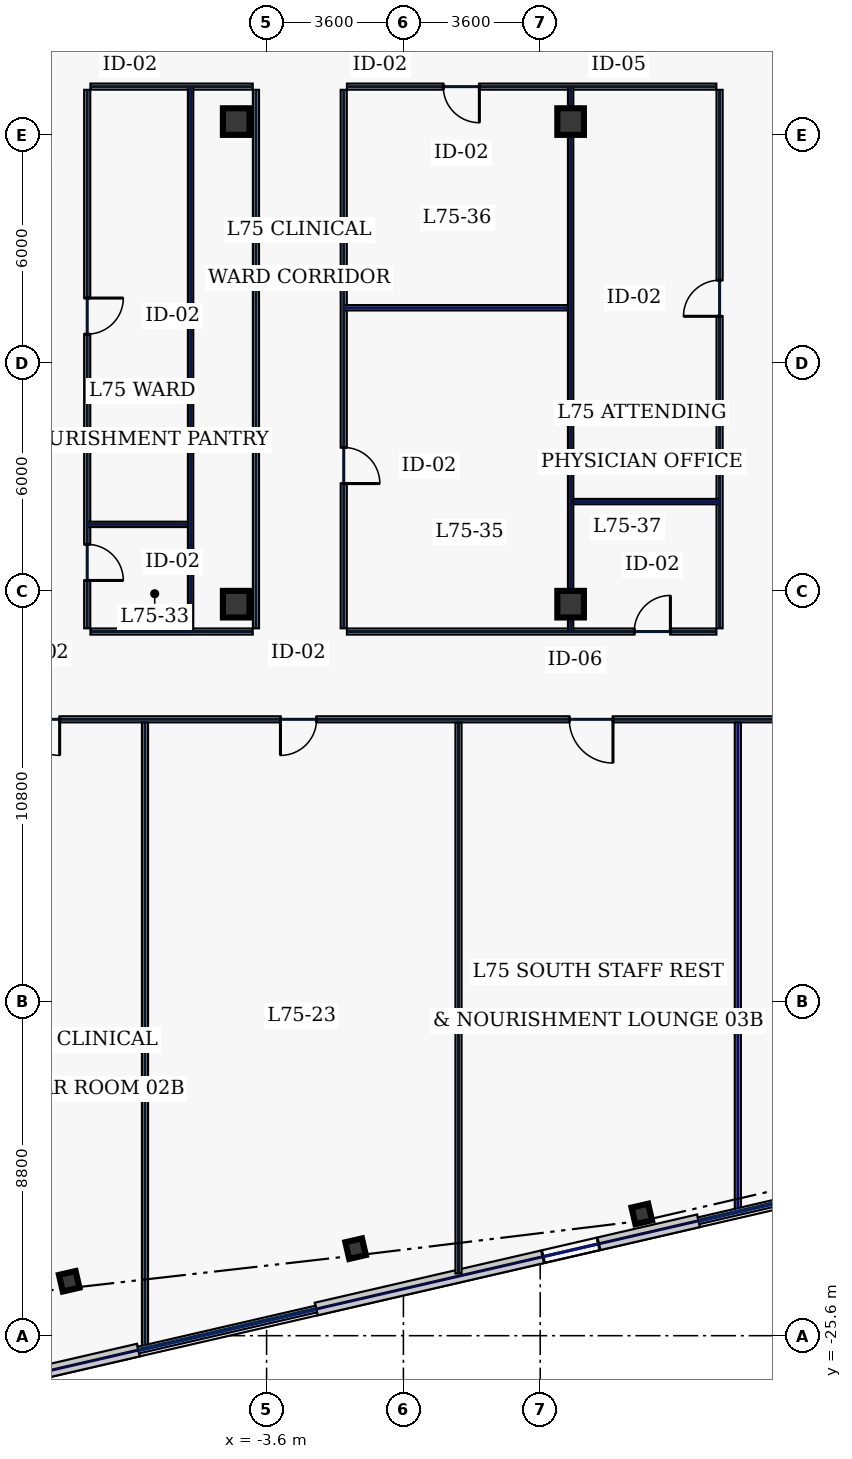
"""IFC4 building model, lengths in metres.
Left out: names, types, materials, properties, quantities, classifications, styles, units other than length and angle.
Written with IfcOpenShell. Run it as: python <this file> out.ifc"""

import sys

from ifc_helpers import new_model, si_unit, direction, frame, frame_2d, origin, origin_2d, place, context, subcontext, project, spatial, rectangle, hollow_rectangle, extrude, element, fill, save


model = new_model("IFC4")
c1 = context("Model", 3, precision=1e-05, world=origin(), true_north=direction((0.0, 1.0)))
c2 = subcontext(c1, "Body", "Model", "MODEL_VIEW")
j1 = project(units=[si_unit("LENGTHUNIT", "METRE"), si_unit("PLANEANGLEUNIT", "RADIAN")], contexts=[c1])
p1 = place(None, origin())
s1 = spatial("IfcSite", under=j1, at=p1, CompositionType="ELEMENT")
p2 = place(p1, origin())
s2 = spatial("IfcBuilding", under=s1, at=p2, CompositionType="ELEMENT")
p3 = place(p2, frame((0.0, 0.0, 321.0)))
s3 = spatial("IfcBuildingStorey", under=s2, at=p3, CompositionType="ELEMENT", Elevation=321.0)
for number, where, z_axis, x_axis in (
    (1, (-4.4, -6.35, 0.0), (0.0, 0.0, 1.0), (1.0, 0.0, 0.0)),
    (2, (4.4, -6.35, 0.0), (0.0, 0.0, 1.0), (1.0, 0.0, 0.0)),
    (3, (-4.4, 6.35, 0.0), (0.0, 0.0, 1.0), (1.0, 0.0, 0.0)),
    (4, (4.4, 6.35, 0.0), (0.0, 0.0, 1.0), (1.0, 0.0, 0.0)),
):
    element("IfcColumn", number, at=place(p3, frame(where, z_axis=z_axis, x_axis=x_axis)), inside=s3, PredefinedType="COLUMN", context=c2, shape_type="SweptSolid", body=[
        extrude(hollow_rectangle(XDim=0.7, YDim=0.7, WallThickness=0.032, at=origin_2d()), origin(), (0.0, 0.0, 1.0), 3.74),
    ])
for number, where, z_axis, x_axis in (
    (5, (-8.794, -24.168, 0.0), (0.0, 0.0, 1.0), (0.974, 0.225, 0.0)),
    (6, (-1.258, -23.31, 0.0), (0.0, 0.0, 1.0), (0.974, 0.225, 0.0)),
    (7, (6.273, -22.397, 0.0), (0.0, 0.0, 1.0), (0.974, 0.225, 0.0)),
):
    element("IfcColumn", number, at=place(p3, frame(where, z_axis=z_axis, x_axis=x_axis)), inside=s3, PredefinedType="COLUMN", context=c2, shape_type="SweptSolid", body=[
        extrude(hollow_rectangle(XDim=0.45, YDim=0.45, WallThickness=0.022, at=origin_2d()), origin(), (0.0, 0.0, 1.0), 3.74),
    ])
p4 = place(p3, frame((-24.03, -29.916, 0.0), z_axis=(0.0, 0.0, 1.0), x_axis=(0.974370978061, 0.224947098473, 0.0)))
e8 = element("IfcWall", 8, at=p4, inside=s3, PredefinedType="STANDARD", context=c2, shape_type="SweptSolid", body=[
    extrude(rectangle(XDim=17.506, YDim=0.34, at=frame_2d((8.753, 0.0))), origin(), (0.0, 0.0, 1.0), 3.74),
])
p5 = place(p4, frame((2.35, 0.0, 0.9)))
e9 = element("IfcOpeningElement", 9, at=p5, cuts=e8, PredefinedType="OPENING", context=c2, shape_type="SweptSolid", body=[
    extrude(rectangle(XDim=1.5, YDim=2.0, at=frame_2d((0.75, 1.0))), frame((0.0, 0.18, 0.0), z_axis=(0.0, -1.0, 0.0), x_axis=(1.0, 0.0, 0.0)), (0.0, 0.0, 1.0), 0.36),
])
p6 = place(p4, frame((5.817, 0.0, 0.9)))
e10 = element("IfcOpeningElement", 10, at=p6, cuts=e8, PredefinedType="OPENING", context=c2, shape_type="SweptSolid", body=[
    extrude(rectangle(XDim=1.5, YDim=2.0, at=frame_2d((0.75, 1.0))), frame((0.0, 0.18, 0.0), z_axis=(0.0, -1.0, 0.0), x_axis=(1.0, 0.0, 0.0)), (0.0, 0.0, 1.0), 0.36),
])
p7 = place(p4, frame((9.886, 0.0, 0.9)))
e11 = element("IfcOpeningElement", 11, at=p7, cuts=e8, PredefinedType="OPENING", context=c2, shape_type="SweptSolid", body=[
    extrude(rectangle(XDim=1.5, YDim=2.0, at=frame_2d((0.75, 1.0))), frame((0.0, 0.18, 0.0), z_axis=(0.0, -1.0, 0.0), x_axis=(1.0, 0.0, 0.0)), (0.0, 0.0, 1.0), 0.36),
])
p8 = place(p4, frame((13.353, 0.0, 0.9)))
e12 = element("IfcOpeningElement", 12, at=p8, cuts=e8, PredefinedType="OPENING", context=c2, shape_type="SweptSolid", body=[
    extrude(rectangle(XDim=1.5, YDim=2.0, at=frame_2d((0.75, 1.0))), frame((0.0, 0.18, 0.0), z_axis=(0.0, -1.0, 0.0), x_axis=(1.0, 0.0, 0.0)), (0.0, 0.0, 1.0), 0.36),
])
p9 = place(p3, frame((-2.295, -24.898, 0.0), z_axis=(0.0, 0.0, 1.0), x_axis=(0.974370872906, 0.224947553958, 0.0)))
e13 = element("IfcWall", 13, at=p9, inside=s3, PredefinedType="STANDARD", context=c2, shape_type="SweptSolid", body=[
    extrude(rectangle(XDim=10.328, YDim=0.34, at=frame_2d((5.164, 0.0))), origin(), (0.0, 0.0, 1.0), 3.74),
])
p10 = place(p9, frame((6.124, 0.0, 0.9)))
e14 = element("IfcOpeningElement", 14, at=p10, cuts=e13, PredefinedType="OPENING", context=c2, shape_type="SweptSolid", body=[
    extrude(rectangle(XDim=1.5, YDim=2.0, at=frame_2d((0.75, 1.0))), frame((0.0, 0.18, 0.0), z_axis=(0.0, -1.0, 0.0), x_axis=(1.0, 0.0, 0.0)), (0.0, 0.0, 1.0), 0.36),
])
p11 = place(p3, frame((24.145, -9.38, 0.0), z_axis=(0.0, 0.0, 1.0), x_axis=(-1.0, 0.0, 0.0)))
e15 = element("IfcWall", 15, at=p11, inside=s3, PredefinedType="PARTITIONING", context=c2, shape_type="SweptSolid", body=[
    extrude(rectangle(XDim=36.68, YDim=0.16, at=frame_2d((18.34, 0.0))), origin(), (0.0, 0.0, 1.0), 3.74),
])
p12 = place(p11, frame((33.19, 0.0, 0.0)))
e16 = element("IfcOpeningElement", 16, at=p12, cuts=e15, PredefinedType="OPENING", context=c2, shape_type="SweptSolid", body=[
    extrude(rectangle(XDim=0.95, YDim=2.2, at=frame_2d((0.475, 1.1))), frame((0.0, 0.09, 0.0), z_axis=(0.0, -1.0, 0.0), x_axis=(1.0, 0.0, 0.0)), (0.0, 0.0, 1.0), 0.18),
])
p13 = place(p11, frame((26.43, 0.0, 0.0)))
e17 = element("IfcOpeningElement", 17, at=p13, cuts=e15, PredefinedType="OPENING", context=c2, shape_type="SweptSolid", body=[
    extrude(rectangle(XDim=0.95, YDim=2.2, at=frame_2d((0.475, 1.1))), frame((0.0, 0.09, 0.0), z_axis=(0.0, -1.0, 0.0), x_axis=(1.0, 0.0, 0.0)), (0.0, 0.0, 1.0), 0.18),
])
p14 = place(p11, frame((18.63, 0.0, 0.0)))
e18 = element("IfcOpeningElement", 18, at=p14, cuts=e15, PredefinedType="OPENING", context=c2, shape_type="SweptSolid", body=[
    extrude(rectangle(XDim=1.15, YDim=2.2, at=frame_2d((0.575, 1.1))), frame((0.0, 0.09, 0.0), z_axis=(0.0, -1.0, 0.0), x_axis=(1.0, 0.0, 0.0)), (0.0, 0.0, 1.0), 0.18),
])
p15 = place(p11, frame((9.565, 0.0, 0.0)))
e19 = element("IfcOpeningElement", 19, at=p15, cuts=e15, PredefinedType="OPENING", context=c2, shape_type="SweptSolid", body=[
    extrude(rectangle(XDim=0.95, YDim=2.2, at=frame_2d((0.475, 1.1))), frame((0.0, 0.09, 0.0), z_axis=(0.0, -1.0, 0.0), x_axis=(1.0, 0.0, 0.0)), (0.0, 0.0, 1.0), 0.18),
])
p16 = place(p11, frame((1.869, 0.0, 0.0)))
e20 = element("IfcOpeningElement", 20, at=p16, cuts=e15, PredefinedType="OPENING", context=c2, shape_type="SweptSolid", body=[
    extrude(rectangle(XDim=1.3, YDim=2.2, at=frame_2d((0.65, 1.1))), frame((0.0, 0.09, 0.0), z_axis=(0.0, -1.0, 0.0), x_axis=(1.0, 0.0, 0.0)), (0.0, 0.0, 1.0), 0.18),
])
p17 = place(p3, frame((8.235, 7.27, 0.0), z_axis=(0.0, 0.0, 1.0), x_axis=(-1.0, 0.0, 0.0)))
e21 = element("IfcWall", 21, at=p17, inside=s3, PredefinedType="PARTITIONING", context=c2, shape_type="SweptSolid", body=[
    extrude(rectangle(XDim=9.72, YDim=0.16, at=frame_2d((4.86, 0.0))), origin(), (0.0, 0.0, 1.0), 3.74),
])
p18 = place(p17, frame((6.236, 0.0, 0.0)))
e22 = element("IfcOpeningElement", 22, at=p18, cuts=e21, PredefinedType="OPENING", context=c2, shape_type="SweptSolid", body=[
    extrude(rectangle(XDim=0.95, YDim=2.2, at=frame_2d((0.475, 1.1))), frame((0.0, 0.09, 0.0), z_axis=(0.0, -1.0, 0.0), x_axis=(1.0, 0.0, 0.0)), (0.0, 0.0, 1.0), 0.18),
])
p19 = place(p3, frame((-1.57, 7.185, 0.0), z_axis=(0.0, 0.0, 1.0), x_axis=(0.0, -1.0, 0.0)))
e23 = element("IfcWall", 23, at=p19, inside=s3, PredefinedType="PARTITIONING", context=c2, shape_type="SweptSolid", body=[
    extrude(rectangle(XDim=14.17, YDim=0.16, at=frame_2d((7.085, 0.0))), origin(), (0.0, 0.0, 1.0), 3.74),
])
p20 = place(p19, frame((9.411, 0.0, 0.0)))
e24 = element("IfcOpeningElement", 24, at=p20, cuts=e23, PredefinedType="OPENING", context=c2, shape_type="SweptSolid", body=[
    extrude(rectangle(XDim=0.95, YDim=2.2, at=frame_2d((0.475, 1.1))), frame((0.0, 0.09, 0.0), z_axis=(0.0, -1.0, 0.0), x_axis=(1.0, 0.0, 0.0)), (0.0, 0.0, 1.0), 0.18),
])
p21 = place(p3, frame((-1.485, -7.07, 0.0), z_axis=(0.0, 0.0, 1.0), x_axis=(1.0, 0.0, 0.0)))
e25 = element("IfcWall", 25, at=p21, inside=s3, PredefinedType="PARTITIONING", context=c2, shape_type="SweptSolid", body=[
    extrude(rectangle(XDim=9.72, YDim=0.16, at=frame_2d((4.86, 0.0))), origin(), (0.0, 0.0, 1.0), 3.74),
])
p22 = place(p21, frame((7.561, 0.0, 0.0)))
e26 = element("IfcOpeningElement", 26, at=p22, cuts=e25, PredefinedType="OPENING", context=c2, shape_type="SweptSolid", body=[
    extrude(rectangle(XDim=0.95, YDim=2.2, at=frame_2d((0.475, 1.1))), frame((0.0, 0.09, 0.0), z_axis=(0.0, -1.0, 0.0), x_axis=(1.0, 0.0, 0.0)), (0.0, 0.0, 1.0), 0.18),
])
p23 = place(p3, frame((8.32, -6.985, 0.0), z_axis=(0.0, 0.0, 1.0), x_axis=(0.0, 1.0, 0.0)))
e27 = element("IfcWall", 27, at=p23, inside=s3, PredefinedType="PARTITIONING", context=c2, shape_type="SweptSolid", body=[
    extrude(rectangle(XDim=14.17, YDim=0.16, at=frame_2d((7.085, 0.0))), origin(), (0.0, 0.0, 1.0), 3.74),
])
p24 = place(p23, frame((8.211, 0.0, 0.0)))
e28 = element("IfcOpeningElement", 28, at=p24, cuts=e27, PredefinedType="OPENING", context=c2, shape_type="SweptSolid", body=[
    extrude(rectangle(XDim=0.95, YDim=2.2, at=frame_2d((0.475, 1.1))), frame((0.0, 0.09, 0.0), z_axis=(0.0, -1.0, 0.0), x_axis=(1.0, 0.0, 0.0)), (0.0, 0.0, 1.0), 0.18),
])
p25 = place(p3, frame((-3.88, -6.985, 0.0), z_axis=(0.0, 0.0, 1.0), x_axis=(0.0, 1.0, 0.0)))
e29 = element("IfcWall", 29, at=p25, inside=s3, PredefinedType="PARTITIONING", context=c2, shape_type="SweptSolid", body=[
    extrude(rectangle(XDim=14.17, YDim=0.16, at=frame_2d((7.085, 0.0))), origin(), (0.0, 0.0, 1.0), 3.74),
])
p26 = place(p3, frame((-3.965, 7.27, 0.0), z_axis=(0.0, 0.0, 1.0), x_axis=(-1.0, 0.0, 0.0)))
e30 = element("IfcWall", 30, at=p26, inside=s3, PredefinedType="PARTITIONING", context=c2, shape_type="SweptSolid", body=[
    extrude(rectangle(XDim=4.27, YDim=0.16, at=frame_2d((2.135, 0.0))), origin(), (0.0, 0.0, 1.0), 3.74),
])
p27 = place(p3, frame((-8.32, 7.185, 0.0), z_axis=(0.0, 0.0, 1.0), x_axis=(0.0, -1.0, 0.0)))
e31 = element("IfcWall", 31, at=p27, inside=s3, PredefinedType="PARTITIONING", context=c2, shape_type="SweptSolid", body=[
    extrude(rectangle(XDim=14.17, YDim=0.16, at=frame_2d((7.085, 0.0))), origin(), (0.0, 0.0, 1.0), 3.74),
])
p28 = place(p27, frame((11.961, 0.0, 0.0)))
e32 = element("IfcOpeningElement", 32, at=p28, cuts=e31, PredefinedType="OPENING", context=c2, shape_type="SweptSolid", body=[
    extrude(rectangle(XDim=0.95, YDim=2.2, at=frame_2d((0.475, 1.1))), frame((0.0, 0.09, 0.0), z_axis=(0.0, -1.0, 0.0), x_axis=(1.0, 0.0, 0.0)), (0.0, 0.0, 1.0), 0.18),
])
p29 = place(p27, frame((5.479, 0.0, 0.0)))
e33 = element("IfcOpeningElement", 33, at=p29, cuts=e31, PredefinedType="OPENING", context=c2, shape_type="SweptSolid", body=[
    extrude(rectangle(XDim=0.95, YDim=2.2, at=frame_2d((0.475, 1.1))), frame((0.0, 0.09, 0.0), z_axis=(0.0, -1.0, 0.0), x_axis=(1.0, 0.0, 0.0)), (0.0, 0.0, 1.0), 0.18),
])
p30 = place(p3, frame((-8.235, -7.07, 0.0), z_axis=(0.0, 0.0, 1.0), x_axis=(1.0, 0.0, 0.0)))
e34 = element("IfcWall", 34, at=p30, inside=s3, PredefinedType="PARTITIONING", context=c2, shape_type="SweptSolid", body=[
    extrude(rectangle(XDim=4.27, YDim=0.16, at=frame_2d((2.135, 0.0))), origin(), (0.0, 0.0, 1.0), 3.74),
])
p31 = place(p3, frame((-6.8, -25.867, 0.0), z_axis=(0.0, 0.0, 1.0), x_axis=(0.0, 1.0, 0.0)))
e35 = element("IfcWall", 35, at=p31, inside=s3, PredefinedType="PARTITIONING", context=c2, shape_type="SweptSolid", body=[
    extrude(rectangle(XDim=16.402, YDim=0.16, at=frame_2d((8.201, 0.0))), origin(), (0.0, 0.0, 1.0), 3.74),
])
p32 = place(p3, frame((8.8, -22.265, 0.0), z_axis=(0.0, 0.0, 1.0), x_axis=(0.0, 1.0, 0.0)))
e36 = element("IfcWall", 36, at=p32, inside=s3, PredefinedType="PARTITIONING", context=c2, shape_type="SweptSolid", body=[
    extrude(rectangle(XDim=12.8, YDim=0.16, at=frame_2d((6.4, 0.0))), origin(), (0.0, 0.0, 1.0), 3.165),
])
p33 = place(p3, frame((1.45, -23.962, 0.0), z_axis=(0.0, 0.0, 1.0), x_axis=(0.0, 1.0, 0.0)))
e37 = element("IfcWall", 37, at=p33, inside=s3, PredefinedType="PARTITIONING", context=c2, shape_type="SweptSolid", body=[
    extrude(rectangle(XDim=14.497, YDim=0.16, at=frame_2d((7.249, 0.0))), origin(), (0.0, 0.0, 1.0), 3.74),
])
p34 = place(p3, frame((-5.6, -7.065, 0.0), z_axis=(0.0, 0.0, 1.0), x_axis=(0.0, 1.0, 0.0)))
e38 = element("IfcWall", 38, at=p34, inside=s3, PredefinedType="PARTITIONING", context=c2, shape_type="SweptSolid", body=[
    extrude(rectangle(XDim=14.33, YDim=0.14, at=frame_2d((7.165, 0.0))), origin(), (0.0, 0.0, 1.0), 3.74),
])
p35 = place(p3, frame((4.4, -7.065, 0.0), z_axis=(0.0, 0.0, 1.0), x_axis=(0.0, 1.0, 0.0)))
e39 = element("IfcWall", 39, at=p35, inside=s3, PredefinedType="PARTITIONING", context=c2, shape_type="SweptSolid", body=[
    extrude(rectangle(XDim=14.33, YDim=0.14, at=frame_2d((7.165, 0.0))), origin(), (0.0, 0.0, 1.0), 3.035),
])
p36 = place(p3, frame((-1.565, 1.45, 0.0), z_axis=(0.0, 0.0, 1.0), x_axis=(1.0, 0.0, 0.0)))
e40 = element("IfcWall", 40, at=p36, inside=s3, PredefinedType="PARTITIONING", context=c2, shape_type="SweptSolid", body=[
    extrude(rectangle(XDim=5.89, YDim=0.14, at=frame_2d((2.945, 0.0))), origin(), (0.0, 0.0, 1.0), 3.74),
])
p37 = place(p3, frame((-8.315, -4.25, 0.0), z_axis=(0.0, 0.0, 1.0), x_axis=(1.0, 0.0, 0.0)))
e41 = element("IfcWall", 41, at=p37, inside=s3, PredefinedType="PARTITIONING", context=c2, shape_type="SweptSolid", body=[
    extrude(rectangle(XDim=2.64, YDim=0.14, at=frame_2d((1.32, 0.0))), origin(), (0.0, 0.0, 1.0), 3.74),
])
p38 = place(p3, frame((4.475, -3.65, 0.0), z_axis=(0.0, 0.0, 1.0), x_axis=(1.0, 0.0, 0.0)))
e42 = element("IfcWall", 42, at=p38, inside=s3, PredefinedType="PARTITIONING", context=c2, shape_type="SweptSolid", body=[
    extrude(rectangle(XDim=3.84, YDim=0.14, at=frame_2d((1.92, 0.0))), origin(), (0.0, 0.0, 1.0), 3.74),
])
p39 = place(p10, origin())
e43 = element("IfcWindow", 43, at=p39, inside=s3, PartitioningType="SINGLE_PANEL", PredefinedType="WINDOW", context=c2, shape_type="SweptSolid", body=[
    extrude(rectangle(XDim=1.5, YDim=2.0, at=frame_2d((0.75, 1.0))), frame((0.0, 0.03, 0.0), z_axis=(0.0, -1.0, 0.0), x_axis=(1.0, 0.0, 0.0)), (0.0, 0.0, 1.0), 0.06),
])
fill(e14, e43)
p40 = place(p12, origin())
e44 = element("IfcDoor", 44, at=p40, inside=s3, OperationType="SINGLE_SWING_LEFT", PredefinedType="DOOR", context=c2, shape_type="SweptSolid", body=[
    extrude(rectangle(XDim=0.95, YDim=2.2, at=frame_2d((0.475, 1.1))), frame((0.0, 0.025, 0.0), z_axis=(0.0, -1.0, 0.0), x_axis=(1.0, 0.0, 0.0)), (0.0, 0.0, 1.0), 0.05),
])
fill(e16, e44)
p41 = place(p13, origin())
e45 = element("IfcDoor", 45, at=p41, inside=s3, OperationType="SINGLE_SWING_RIGHT", PredefinedType="DOOR", context=c2, shape_type="SweptSolid", body=[
    extrude(rectangle(XDim=0.95, YDim=2.2, at=frame_2d((0.475, 1.1))), frame((0.0, 0.025, 0.0), z_axis=(0.0, -1.0, 0.0), x_axis=(1.0, 0.0, 0.0)), (0.0, 0.0, 1.0), 0.05),
])
fill(e17, e45)
p42 = place(p14, origin())
e46 = element("IfcDoor", 46, at=p42, inside=s3, OperationType="SINGLE_SWING_LEFT", PredefinedType="DOOR", context=c2, shape_type="SweptSolid", body=[
    extrude(rectangle(XDim=1.15, YDim=2.2, at=frame_2d((0.575, 1.1))), frame((0.0, 0.025, 0.0), z_axis=(0.0, -1.0, 0.0), x_axis=(1.0, 0.0, 0.0)), (0.0, 0.0, 1.0), 0.05),
])
fill(e18, e46)
p43 = place(p28, origin())
e47 = element("IfcDoor", 47, at=p43, inside=s3, OperationType="SINGLE_SWING_RIGHT", PredefinedType="DOOR", context=c2, shape_type="SweptSolid", body=[
    extrude(rectangle(XDim=0.95, YDim=2.2, at=frame_2d((0.475, 1.1))), frame((0.0, 0.025, 0.0), z_axis=(0.0, -1.0, 0.0), x_axis=(1.0, 0.0, 0.0)), (0.0, 0.0, 1.0), 0.05),
])
fill(e32, e47)
p44 = place(p29, origin())
e48 = element("IfcDoor", 48, at=p44, inside=s3, OperationType="SINGLE_SWING_LEFT", PredefinedType="DOOR", context=c2, shape_type="SweptSolid", body=[
    extrude(rectangle(XDim=0.95, YDim=2.2, at=frame_2d((0.475, 1.1))), frame((0.0, 0.025, 0.0), z_axis=(0.0, -1.0, 0.0), x_axis=(1.0, 0.0, 0.0)), (0.0, 0.0, 1.0), 0.05),
])
fill(e33, e48)
p45 = place(p20, origin())
e49 = element("IfcDoor", 49, at=p45, inside=s3, OperationType="SINGLE_SWING_RIGHT", PredefinedType="DOOR", context=c2, shape_type="SweptSolid", body=[
    extrude(rectangle(XDim=0.95, YDim=2.2, at=frame_2d((0.475, 1.1))), frame((0.0, 0.025, 0.0), z_axis=(0.0, -1.0, 0.0), x_axis=(1.0, 0.0, 0.0)), (0.0, 0.0, 1.0), 0.05),
])
fill(e24, e49)
p46 = place(p18, origin())
e50 = element("IfcDoor", 50, at=p46, inside=s3, OperationType="SINGLE_SWING_LEFT", PredefinedType="DOOR", context=c2, shape_type="SweptSolid", body=[
    extrude(rectangle(XDim=0.95, YDim=2.2, at=frame_2d((0.475, 1.1))), frame((0.0, 0.025, 0.0), z_axis=(0.0, -1.0, 0.0), x_axis=(1.0, 0.0, 0.0)), (0.0, 0.0, 1.0), 0.05),
])
fill(e22, e50)
p47 = place(p22, origin())
e51 = element("IfcDoor", 51, at=p47, inside=s3, OperationType="SINGLE_SWING_RIGHT", PredefinedType="DOOR", context=c2, shape_type="SweptSolid", body=[
    extrude(rectangle(XDim=0.95, YDim=2.2, at=frame_2d((0.475, 1.1))), frame((0.0, 0.025, 0.0), z_axis=(0.0, -1.0, 0.0), x_axis=(1.0, 0.0, 0.0)), (0.0, 0.0, 1.0), 0.05),
])
fill(e26, e51)
p48 = place(p24, origin())
e52 = element("IfcDoor", 52, at=p48, inside=s3, OperationType="SINGLE_SWING_LEFT", PredefinedType="DOOR", context=c2, shape_type="SweptSolid", body=[
    extrude(rectangle(XDim=0.95, YDim=2.2, at=frame_2d((0.475, 1.1))), frame((0.0, 0.025, 0.0), z_axis=(0.0, -1.0, 0.0), x_axis=(1.0, 0.0, 0.0)), (0.0, 0.0, 1.0), 0.05),
])
fill(e28, e52)
save(model, sys.argv[1])
